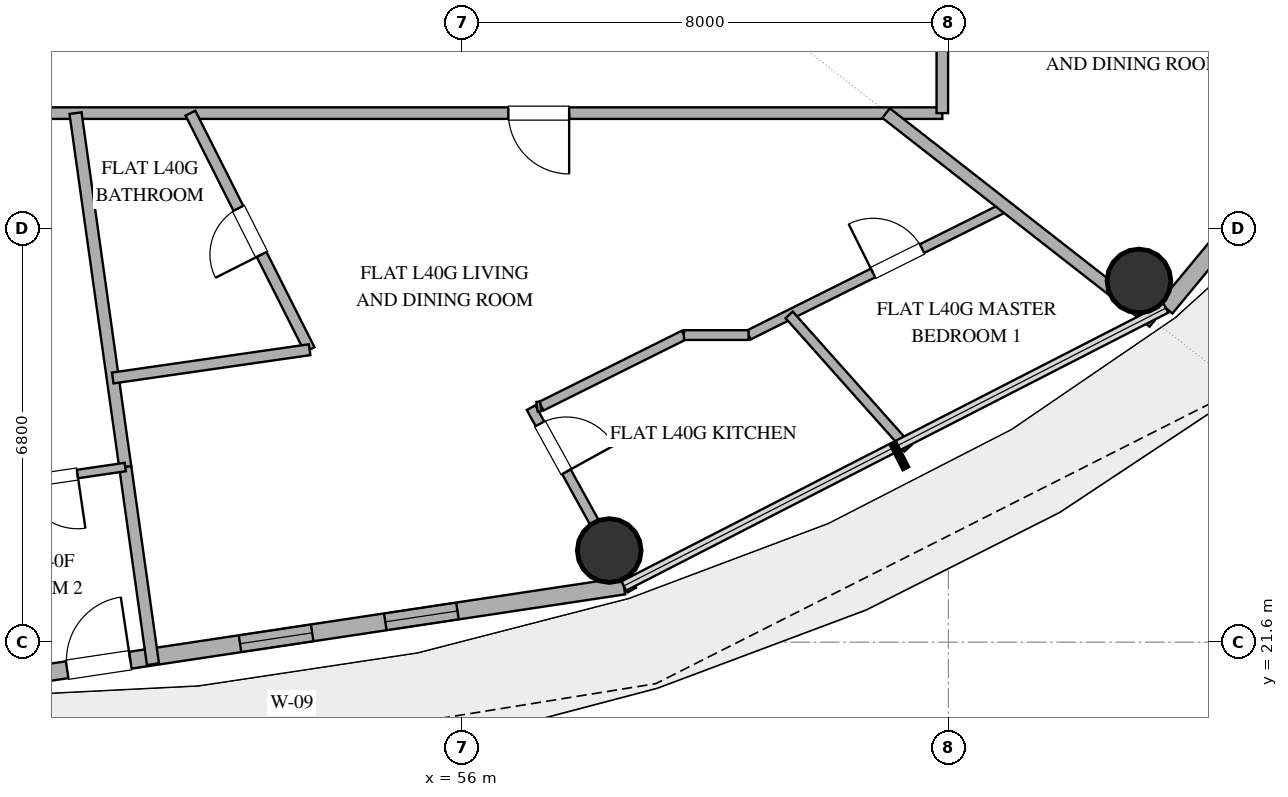
"""IFC4 building model, lengths in metres.
Left out: names, types, materials, properties, quantities, classifications, styles, units other than length and angle.
Written with IfcOpenShell. Run it as: python <this file> out.ifc"""

import sys

from ifc_helpers import new_model, si_unit, direction, frame, frame_2d, origin, origin_2d, place, context, subcontext, project, spatial, rectangle, hollow_circle, extrude, element, fill, save


model = new_model("IFC4")
c1 = context("Model", 3, precision=1e-05, world=origin(), true_north=direction((0.0, 1.0)))
c2 = subcontext(c1, "Body", "Model", "MODEL_VIEW")
j1 = project(units=[si_unit("LENGTHUNIT", "METRE"), si_unit("PLANEANGLEUNIT", "RADIAN")], contexts=[c1])
p1 = place(None, origin())
s1 = spatial("IfcSite", under=j1, at=p1, CompositionType="ELEMENT")
p2 = place(p1, origin())
s2 = spatial("IfcBuilding", under=s1, at=p2, CompositionType="ELEMENT")
p3 = place(p2, frame((0.0, 0.0, 161.4)))
s3 = spatial("IfcBuildingStorey", under=s2, at=p3, CompositionType="ELEMENT", Elevation=161.4)
for number, where, z_axis, x_axis in (
    (1, (58.422, 23.107, 0.0), (0.0, 0.0, 1.0), (1.0, 0.0, 0.0)),
    (2, (67.134, 27.54, 0.0), (0.0, 0.0, 1.0), (1.0, 0.0, 0.0)),
):
    element("IfcColumn", number, at=place(p3, frame(where, z_axis=z_axis, x_axis=x_axis)), inside=s3, PredefinedType="COLUMN", context=c2, shape_type="SweptSolid", body=[
        extrude(hollow_circle(Radius=0.525, WallThickness=0.028, at=origin_2d()), origin(), (0.0, 0.0, 1.0), 3.38),
    ])
p4 = place(p3, frame((48.0, 20.92, 0.0), z_axis=(0.0, 0.0, 1.0), x_axis=(0.988863993413, 0.148822049884, 0.0)))
e3 = element("IfcWall", 3, at=p4, inside=s3, PredefinedType="SOLIDWALL", context=c2, shape_type="SweptSolid", body=[
    extrude(rectangle(XDim=10.783, YDim=0.28, at=frame_2d((5.392, 0.0))), origin(), (0.0, 0.0, 1.0), 3.38),
])
p5 = place(p4, frame((1.524, 0.0, 0.0)))
e4 = element("IfcOpeningElement", 4, at=p5, cuts=e3, PredefinedType="OPENING", context=c2, shape_type="SweptSolid", body=[
    extrude(rectangle(XDim=1.05, YDim=2.2, at=frame_2d((0.525, 1.1))), frame((0.0, 0.15, 0.0), z_axis=(0.0, -1.0, 0.0), x_axis=(1.0, 0.0, 0.0)), (0.0, 0.0, 1.0), 0.3),
])
p6 = place(p4, frame((4.399, 0.0, 0.85)))
e5 = element("IfcOpeningElement", 5, at=p6, cuts=e3, PredefinedType="OPENING", context=c2, shape_type="SweptSolid", body=[
    extrude(rectangle(XDim=1.2, YDim=1.8, at=frame_2d((0.6, 0.9))), frame((0.0, 0.15, 0.0), z_axis=(0.0, -1.0, 0.0), x_axis=(1.0, 0.0, 0.0)), (0.0, 0.0, 1.0), 0.3),
])
p7 = place(p4, frame((6.815, 0.0, 0.85)))
e6 = element("IfcOpeningElement", 6, at=p7, cuts=e3, PredefinedType="OPENING", context=c2, shape_type="SweptSolid", body=[
    extrude(rectangle(XDim=1.2, YDim=1.8, at=frame_2d((0.6, 0.9))), frame((0.0, 0.15, 0.0), z_axis=(0.0, -1.0, 0.0), x_axis=(1.0, 0.0, 0.0)), (0.0, 0.0, 1.0), 0.3),
])
p8 = place(p3, frame((67.576, 27.094, 0.0), z_axis=(0.0, 0.0, 1.0), x_axis=(0.637333477683, 0.770588111915, 0.0)))
e7 = element("IfcWall", 7, at=p8, inside=s3, PredefinedType="SOLIDWALL", context=c2, shape_type="SweptSolid", body=[
    extrude(rectangle(XDim=8.875, YDim=0.28, at=frame_2d((4.438, 0.0))), origin(), (0.0, 0.0, 1.0), 3.38),
])
p9 = place(p8, frame((2.607, 0.0, 0.85)))
e8 = element("IfcOpeningElement", 8, at=p9, cuts=e7, PredefinedType="OPENING", context=c2, shape_type="SweptSolid", body=[
    extrude(rectangle(XDim=1.2, YDim=1.6, at=frame_2d((0.6, 0.8))), frame((0.0, 0.15, 0.0), z_axis=(0.0, -1.0, 0.0), x_axis=(1.0, 0.0, 0.0)), (0.0, 0.0, 1.0), 0.3),
])
p10 = place(p8, frame((4.952, 0.0, 0.85)))
e9 = element("IfcOpeningElement", 9, at=p10, cuts=e7, PredefinedType="OPENING", context=c2, shape_type="SweptSolid", body=[
    extrude(rectangle(XDim=1.2, YDim=1.6, at=frame_2d((0.6, 0.8))), frame((0.0, 0.15, 0.0), z_axis=(0.0, -1.0, 0.0), x_axis=(1.0, 0.0, 0.0)), (0.0, 0.0, 1.0), 0.3),
])
p11 = place(p3, frame((63.9, 30.3, 0.0), z_axis=(0.0, 0.0, 1.0), x_axis=(-1.0, 0.0, 0.0)))
e10 = element("IfcWall", 10, at=p11, inside=s3, PredefinedType="PARTITIONING", context=c2, shape_type="SweptSolid", body=[
    extrude(rectangle(XDim=15.625, YDim=0.19, at=frame_2d((7.813, 0.0))), origin(), (0.0, 0.0, 1.0), 2.74),
])
p12 = place(p11, frame((6.137, 0.0, 0.0)))
e11 = element("IfcOpeningElement", 11, at=p12, cuts=e10, PredefinedType="OPENING", context=c2, shape_type="SweptSolid", body=[
    extrude(rectangle(XDim=1.0, YDim=2.2, at=frame_2d((0.5, 1.1))), frame((0.0, 0.105, 0.0), z_axis=(0.0, -1.0, 0.0), x_axis=(1.0, 0.0, 0.0)), (0.0, 0.0, 1.0), 0.21),
])
p13 = place(p3, frame((63.9, 40.49, 0.0), z_axis=(0.0, 0.0, 1.0), x_axis=(0.0, -1.0, 0.0)))
e12 = element("IfcWall", 12, at=p13, inside=s3, PredefinedType="PARTITIONING", context=c2, shape_type="SweptSolid", body=[
    extrude(rectangle(XDim=10.19, YDim=0.19, at=frame_2d((5.095, 0.0))), origin(), (0.0, 0.0, 1.0), 2.74),
])
p14 = place(p13, frame((5.659, 0.0, 0.0)))
e13 = element("IfcOpeningElement", 13, at=p14, cuts=e12, PredefinedType="OPENING", context=c2, shape_type="SweptSolid", body=[
    extrude(rectangle(XDim=1.0, YDim=2.2, at=frame_2d((0.5, 1.1))), frame((0.0, 0.105, 0.0), z_axis=(0.0, -1.0, 0.0), x_axis=(1.0, 0.0, 0.0)), (0.0, 0.0, 1.0), 0.21),
])
p15 = place(p3, frame((49.644, 30.3, 0.0), z_axis=(0.0, 0.0, 1.0), x_axis=(0.139158723068, -0.990270089316, 0.0)))
e14 = element("IfcWall", 14, at=p15, inside=s3, PredefinedType="PARTITIONING", context=c2, shape_type="SweptSolid", body=[
    extrude(rectangle(XDim=5.877, YDim=0.2, at=frame_2d((2.938, 0.0))), origin(), (0.0, 0.0, 1.0), 2.74),
])
p16 = place(p3, frame((53.494, 26.41, 0.0), z_axis=(0.0, 0.0, 1.0), x_axis=(-0.449879384809, 0.89308932315, 0.0)))
e15 = element("IfcWall", 15, at=p16, inside=s3, PredefinedType="PLUMBINGWALL", context=c2, shape_type="SweptSolid", body=[
    extrude(rectangle(XDim=4.356, YDim=0.18, at=frame_2d((2.178, 0.0))), origin(), (0.0, 0.0, 1.0), 2.74),
])
p17 = place(p16, frame((1.753, 0.0, 0.0)))
e16 = element("IfcOpeningElement", 16, at=p17, cuts=e15, PredefinedType="OPENING", context=c2, shape_type="SweptSolid", body=[
    extrude(rectangle(XDim=0.85, YDim=2.1, at=frame_2d((0.425, 1.05))), frame((0.0, 0.1, 0.0), z_axis=(0.0, -1.0, 0.0), x_axis=(1.0, 0.0, 0.0)), (0.0, 0.0, 1.0), 0.2),
])
p18 = place(p3, frame((60.713, 26.65, 0.0), z_axis=(0.0, 0.0, 1.0), x_axis=(0.894932492822, 0.446201561283, 0.0)))
e17 = element("IfcWall", 17, at=p18, inside=s3, PredefinedType="PLUMBINGWALL", context=c2, shape_type="SweptSolid", body=[
    extrude(rectangle(XDim=4.729, YDim=0.16, at=frame_2d((2.365, 0.0))), origin(), (0.0, 0.0, 1.0), 2.74),
])
p19 = place(p18, frame((2.288, 0.0, 0.0)))
e18 = element("IfcOpeningElement", 18, at=p19, cuts=e17, PredefinedType="OPENING", context=c2, shape_type="SweptSolid", body=[
    extrude(rectangle(XDim=0.9, YDim=2.1, at=frame_2d((0.45, 1.05))), frame((0.0, 0.09, 0.0), z_axis=(0.0, -1.0, 0.0), x_axis=(1.0, 0.0, 0.0)), (0.0, 0.0, 1.0), 0.18),
])
p20 = place(p3, frame((57.135, 25.456, 0.0), z_axis=(0.0, 0.0, 1.0), x_axis=(0.483427589536, -0.875384353113, 0.0)))
e19 = element("IfcWall", 19, at=p20, inside=s3, PredefinedType="PLUMBINGWALL", context=c2, shape_type="SweptSolid", body=[
    extrude(rectangle(XDim=3.427, YDim=0.16, at=frame_2d((1.713, 0.0))), origin(), (0.0, 0.0, 1.0), 2.74),
])
p21 = place(p20, frame((0.303, 0.0, 0.0)))
e20 = element("IfcOpeningElement", 20, at=p21, cuts=e19, PredefinedType="OPENING", context=c2, shape_type="SweptSolid", body=[
    extrude(rectangle(XDim=0.9, YDim=2.1, at=frame_2d((0.45, 1.05))), frame((0.0, 0.09, 0.0), z_axis=(0.0, -1.0, 0.0), x_axis=(1.0, 0.0, 0.0)), (0.0, 0.0, 1.0), 0.18),
])
p22 = place(p3, frame((50.462, 24.48, 0.0), z_axis=(0.0, 0.0, 1.0), x_axis=(0.139145146576, -0.990271997072, 0.0)))
e21 = element("IfcWall", 21, at=p22, inside=s3, PredefinedType="PARTITIONING", context=c2, shape_type="SweptSolid", body=[
    extrude(rectangle(XDim=3.274, YDim=0.2, at=frame_2d((1.637, 0.0))), origin(), (0.0, 0.0, 1.0), 2.74),
])
p23 = place(p3, frame((50.257, 25.944, 0.0), z_axis=(0.0, 0.0, 1.0), x_axis=(0.989826700743, 0.142278257286, 0.0)))
e22 = element("IfcWall", 22, at=p23, inside=s3, PredefinedType="PLUMBINGWALL", context=c2, shape_type="SweptSolid", body=[
    extrude(rectangle(XDim=3.271, YDim=0.18, at=frame_2d((1.635, 0.0))), origin(), (0.0, 0.0, 1.0), 2.74),
])
p24 = place(p3, frame((67.37, 26.866, 0.0), z_axis=(0.0, 0.0, 1.0), x_axis=(-0.788004464355, 0.615669525117, 0.0)))
e23 = element("IfcWall", 23, at=p24, inside=s3, PredefinedType="PARTITIONING", context=c2, shape_type="SweptSolid", body=[
    extrude(rectangle(XDim=5.577, YDim=0.2, at=frame_2d((2.789, 0.0))), origin(), (0.0, 0.0, 1.0), 2.74),
])
p25 = place(p3, frame((63.335, 24.79, 0.0), z_axis=(0.0, 0.0, 1.0), x_axis=(-0.665255741341, 0.746615562799, 0.0)))
e24 = element("IfcWall", 24, at=p25, inside=s3, PredefinedType="PLUMBINGWALL", context=c2, shape_type="SweptSolid", body=[
    extrude(rectangle(XDim=2.938, YDim=0.16, at=frame_2d((1.469, 0.0))), origin(), (0.0, 0.0, 1.0), 2.74),
])
p26 = place(p3, frame((59.651, 26.65, 0.0), z_axis=(0.0, 0.0, 1.0), x_axis=(-0.895041110332, -0.445983644112, 0.0)))
e25 = element("IfcWall", 25, at=p26, inside=s3, PredefinedType="PLUMBINGWALL", context=c2, shape_type="SweptSolid", body=[
    extrude(rectangle(XDim=2.621, YDim=0.16, at=frame_2d((1.311, 0.0))), origin(), (0.0, 0.0, 1.0), 2.74),
])
p27 = place(p3, frame((50.462, 24.48, 0.0), z_axis=(0.0, 0.0, 1.0), x_axis=(-0.989489157172, -0.144607080872, 0.0)))
e26 = element("IfcWall", 26, at=p27, inside=s3, PredefinedType="PARTITIONING", context=c2, shape_type="SweptSolid", body=[
    extrude(rectangle(XDim=2.489, YDim=0.14, at=frame_2d((1.244, 0.0))), origin(), (0.0, 0.0, 1.0), 2.74),
])
p28 = place(p27, frame((0.794, 0.0, 0.0)))
e27 = element("IfcOpeningElement", 27, at=p28, cuts=e26, PredefinedType="OPENING", context=c2, shape_type="SweptSolid", body=[
    extrude(rectangle(XDim=0.9, YDim=2.1, at=frame_2d((0.45, 1.05))), frame((0.0, 0.08, 0.0), z_axis=(0.0, -1.0, 0.0), x_axis=(1.0, 0.0, 0.0)), (0.0, 0.0, 1.0), 0.16),
])
p29 = place(p3, frame((60.713, 26.65, 0.0), z_axis=(0.0, 0.0, 1.0), x_axis=(-1.0, 0.0, 0.0)))
e28 = element("IfcWall", 28, at=p29, inside=s3, PredefinedType="PLUMBINGWALL", context=c2, shape_type="SweptSolid", body=[
    extrude(rectangle(XDim=1.062, YDim=0.16, at=frame_2d((0.531, 0.0))), origin(), (0.0, 0.0, 1.0), 2.74),
])
p30 = place(p3, frame((57.293, 25.479, 0.0), z_axis=(0.0, 0.0, 1.0), x_axis=(-0.989532981063, -0.144306893072, 0.0)))
e29 = element("IfcWall", 29, at=p30, inside=s3, PredefinedType="PLUMBINGWALL", context=c2, shape_type="SweptSolid", body=[
    extrude(rectangle(XDim=0.059, YDim=0.16, at=frame_2d((0.03, 0.0))), origin(), (0.0, 0.0, 1.0), 2.74),
])
p31 = place(p5, origin())
e30 = element("IfcDoor", 30, at=p31, inside=s3, OperationType="SINGLE_SWING_RIGHT", PredefinedType="DOOR", context=c2, shape_type="SweptSolid", body=[
    extrude(rectangle(XDim=1.05, YDim=2.2, at=frame_2d((0.525, 1.1))), frame((0.0, 0.025, 0.0), z_axis=(0.0, -1.0, 0.0), x_axis=(1.0, 0.0, 0.0)), (0.0, 0.0, 1.0), 0.05),
])
fill(e4, e30)
p32 = place(p6, origin())
e31 = element("IfcWindow", 31, at=p32, inside=s3, PartitioningType="SINGLE_PANEL", PredefinedType="WINDOW", context=c2, shape_type="SweptSolid", body=[
    extrude(rectangle(XDim=1.2, YDim=1.8, at=frame_2d((0.6, 0.9))), frame((0.0, 0.03, 0.0), z_axis=(0.0, -1.0, 0.0), x_axis=(1.0, 0.0, 0.0)), (0.0, 0.0, 1.0), 0.06),
])
fill(e5, e31)
p33 = place(p7, origin())
e32 = element("IfcWindow", 32, at=p33, inside=s3, PartitioningType="SINGLE_PANEL", PredefinedType="WINDOW", context=c2, shape_type="SweptSolid", body=[
    extrude(rectangle(XDim=1.2, YDim=1.8, at=frame_2d((0.6, 0.9))), frame((0.0, 0.03, 0.0), z_axis=(0.0, -1.0, 0.0), x_axis=(1.0, 0.0, 0.0)), (0.0, 0.0, 1.0), 0.06),
])
fill(e6, e32)
p34 = place(p12, origin())
e33 = element("IfcDoor", 33, at=p34, inside=s3, OperationType="SINGLE_SWING_LEFT", PredefinedType="DOOR", context=c2, shape_type="SweptSolid", body=[
    extrude(rectangle(XDim=1.0, YDim=2.2, at=frame_2d((0.5, 1.1))), frame((0.0, 0.025, 0.0), z_axis=(0.0, -1.0, 0.0), x_axis=(1.0, 0.0, 0.0)), (0.0, 0.0, 1.0), 0.05),
])
fill(e11, e33)
p35 = place(p17, origin())
e34 = element("IfcDoor", 34, at=p35, inside=s3, OperationType="SINGLE_SWING_LEFT", PredefinedType="DOOR", context=c2, shape_type="SweptSolid", body=[
    extrude(rectangle(XDim=0.85, YDim=2.1, at=frame_2d((0.425, 1.05))), frame((0.0, 0.025, 0.0), z_axis=(0.0, -1.0, 0.0), x_axis=(1.0, 0.0, 0.0)), (0.0, 0.0, 1.0), 0.05),
])
fill(e16, e34)
p36 = place(p19, origin())
e35 = element("IfcDoor", 35, at=p36, inside=s3, OperationType="SINGLE_SWING_LEFT", PredefinedType="DOOR", context=c2, shape_type="SweptSolid", body=[
    extrude(rectangle(XDim=0.9, YDim=2.1, at=frame_2d((0.45, 1.05))), frame((0.0, 0.025, 0.0), z_axis=(0.0, -1.0, 0.0), x_axis=(1.0, 0.0, 0.0)), (0.0, 0.0, 1.0), 0.05),
])
fill(e18, e35)
p37 = place(p21, origin())
e36 = element("IfcDoor", 36, at=p37, inside=s3, OperationType="SINGLE_SWING_RIGHT", PredefinedType="DOOR", context=c2, shape_type="SweptSolid", body=[
    extrude(rectangle(XDim=0.9, YDim=2.1, at=frame_2d((0.45, 1.05))), frame((0.0, 0.025, 0.0), z_axis=(0.0, -1.0, 0.0), x_axis=(1.0, 0.0, 0.0)), (0.0, 0.0, 1.0), 0.05),
])
fill(e20, e36)
p38 = place(p28, origin())
e37 = element("IfcDoor", 37, at=p38, inside=s3, OperationType="SINGLE_SWING_LEFT", PredefinedType="DOOR", context=c2, shape_type="SweptSolid", body=[
    extrude(rectangle(XDim=0.9, YDim=2.1, at=frame_2d((0.45, 1.05))), frame((0.0, 0.025, 0.0), z_axis=(0.0, -1.0, 0.0), x_axis=(1.0, 0.0, 0.0)), (0.0, 0.0, 1.0), 0.05),
])
fill(e27, e37)
save(model, sys.argv[1])
